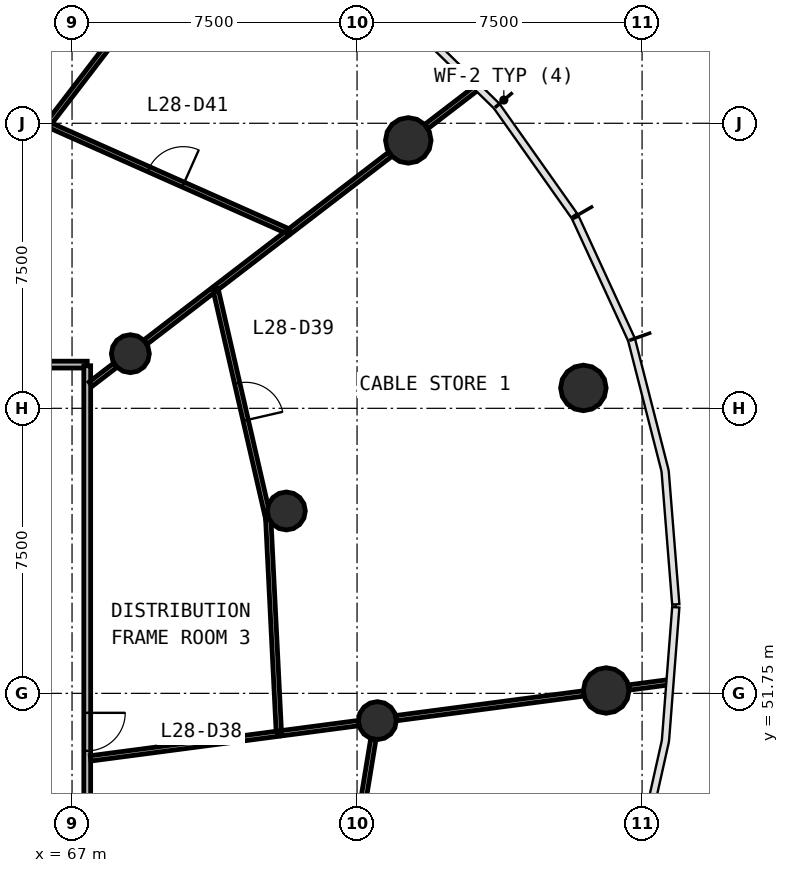
"""IFC4 building model, lengths in metres.
Left out: names, types, materials, properties, quantities, classifications, styles, units other than length and angle.
Written with IfcOpenShell. Run it as: python <this file> out.ifc"""

import sys

from ifc_helpers import new_model, si_unit, direction, frame, frame_2d, origin, origin_2d, place, context, subcontext, project, spatial, rectangle, circle, extrude, source, transform, mapped, element, fill, save


model = new_model("IFC4")
c1 = context("Model", 3, precision=1e-05, world=origin(), true_north=direction((0.0, 1.0)))
c2 = subcontext(c1, "Body", "Model", "MODEL_VIEW")
j1 = project(units=[si_unit("LENGTHUNIT", "METRE"), si_unit("PLANEANGLEUNIT", "RADIAN")], contexts=[c1])
p1 = place(None, origin())
s1 = spatial("IfcSite", under=j1, at=p1, CompositionType="ELEMENT")
p2 = place(p1, origin())
s2 = spatial("IfcBuilding", under=s1, at=p2, CompositionType="ELEMENT")
p3 = place(p2, frame((0.0, 0.0, 120.8)))
s3 = spatial("IfcBuildingStorey", under=s2, at=p3, CompositionType="ELEMENT", Elevation=120.8)
m1 = source(origin(), c2, "Body", "SweptSolid", [
    extrude(circle(Radius=0.6, at=origin_2d()), origin(), (0.0, 0.0, 1.0), 4.1),
])
for number, where, z_axis, x_axis in (
    (1, (81.056, 51.825, 0.0), (0.0, 0.0, 1.0), (1.0, 0.0, 0.0)),
    (2, (80.456, 59.787, 0.0), (0.0, 0.0, 1.0), (1.0, 0.0, 0.0)),
    (3, (75.848, 66.299, 0.0), (0.0, 0.0, 1.0), (1.0, 0.0, 0.0)),
):
    element("IfcColumn", number, at=place(p3, frame(where, z_axis=z_axis, x_axis=x_axis)), inside=s3, PredefinedType="COLUMN", context=c2, shape_type="MappedRepresentation", body=[
        mapped(m1, transform((0.0, 0.0, 0.0), scale=1.0)),
    ])
m2 = source(origin(), c2, "Body", "SweptSolid", [
    extrude(circle(Radius=0.5, at=origin_2d()), origin(), (0.0, 0.0, 1.0), 4.1),
])
for number, where, z_axis, x_axis in (
    (4, (75.034, 51.032, 0.0), (0.0, 0.0, 1.0), (1.0, 0.0, 0.0)),
    (5, (72.639, 56.549, 0.0), (0.0, 0.0, 1.0), (1.0, 0.0, 0.0)),
    (6, (68.535, 60.688, 0.0), (0.0, 0.0, 1.0), (1.0, 0.0, 0.0)),
):
    element("IfcColumn", number, at=place(p3, frame(where, z_axis=z_axis, x_axis=x_axis)), inside=s3, PredefinedType="COLUMN", context=c2, shape_type="MappedRepresentation", body=[
        mapped(m2, transform((0.0, 0.0, 0.0), scale=1.0)),
    ])
p4 = place(p3, frame((36.6, 60.4, 0.0), z_axis=(0.0, 0.0, 1.0), x_axis=(1.0, 0.0, 0.0)))
e7 = element("IfcWall", 7, at=p4, inside=s3, PredefinedType="PARTITIONING", context=c2, shape_type="SweptSolid", body=[
    extrude(rectangle(XDim=30.8, YDim=0.18, at=frame_2d((15.4, 0.0))), origin(), (0.0, 0.0, 1.0), 2.9),
])
p5 = place(p4, frame((14.85, 0.0, 0.0)))
e8 = element("IfcOpeningElement", 8, at=p5, cuts=e7, PredefinedType="OPENING", context=c2, shape_type="SweptSolid", body=[
    extrude(rectangle(XDim=0.9, YDim=2.1, at=frame_2d((0.45, 1.05))), frame((0.0, 0.1, 0.0), z_axis=(0.0, -1.0, 0.0), x_axis=(1.0, 0.0, 0.0)), (0.0, 0.0, 1.0), 0.2),
])
p6 = place(p4, frame((12.65, 0.0, 0.0)))
e9 = element("IfcOpeningElement", 9, at=p6, cuts=e7, PredefinedType="OPENING", context=c2, shape_type="SweptSolid", body=[
    extrude(rectangle(XDim=0.9, YDim=2.1, at=frame_2d((0.45, 1.05))), frame((0.0, 0.1, 0.0), z_axis=(0.0, -1.0, 0.0), x_axis=(1.0, 0.0, 0.0)), (0.0, 0.0, 1.0), 0.2),
])
p7 = place(p4, frame((8.95, 0.0, 0.0)))
e10 = element("IfcOpeningElement", 10, at=p7, cuts=e7, PredefinedType="OPENING", context=c2, shape_type="SweptSolid", body=[
    extrude(rectangle(XDim=1.0, YDim=2.1, at=frame_2d((0.5, 1.05))), frame((0.0, 0.1, 0.0), z_axis=(0.0, -1.0, 0.0), x_axis=(1.0, 0.0, 0.0)), (0.0, 0.0, 1.0), 0.2),
])
p8 = place(p4, frame((17.35, 0.0, 0.0)))
e11 = element("IfcOpeningElement", 11, at=p8, cuts=e7, PredefinedType="OPENING", context=c2, shape_type="SweptSolid", body=[
    extrude(rectangle(XDim=1.0, YDim=2.1, at=frame_2d((0.5, 1.05))), frame((0.0, 0.1, 0.0), z_axis=(0.0, -1.0, 0.0), x_axis=(1.0, 0.0, 0.0)), (0.0, 0.0, 1.0), 0.2),
])
p9 = place(p3, frame((67.4, 60.37, 0.0), z_axis=(0.0, 0.0, 1.0), x_axis=(0.0, -1.0, 0.0)))
e12 = element("IfcWall", 12, at=p9, inside=s3, PredefinedType="PARTITIONING", context=c2, shape_type="SweptSolid", body=[
    extrude(rectangle(XDim=23.583, YDim=0.18, at=frame_2d((11.791, 0.0))), origin(), (0.0, 0.0, 1.0), 2.9),
])
p10 = place(p9, frame((11.333, 0.0, 0.0)))
e13 = element("IfcOpeningElement", 13, at=p10, cuts=e12, PredefinedType="OPENING", context=c2, shape_type="SweptSolid", body=[
    extrude(rectangle(XDim=1.0, YDim=2.1, at=frame_2d((0.5, 1.05))), frame((0.0, 0.1, 0.0), z_axis=(0.0, -1.0, 0.0), x_axis=(1.0, 0.0, 0.0)), (0.0, 0.0, 1.0), 0.2),
])
p11 = place(p9, frame((9.133, 0.0, 0.0)))
e14 = element("IfcOpeningElement", 14, at=p11, cuts=e12, PredefinedType="OPENING", context=c2, shape_type="SweptSolid", body=[
    extrude(rectangle(XDim=1.0, YDim=2.1, at=frame_2d((0.5, 1.05))), frame((0.0, 0.1, 0.0), z_axis=(0.0, -1.0, 0.0), x_axis=(1.0, 0.0, 0.0)), (0.0, 0.0, 1.0), 0.2),
])
p12 = place(p3, frame((66.365, 66.721, 0.0), z_axis=(0.0, 0.0, 1.0), x_axis=(0.913647797107, -0.406506707006, 0.0)))
e15 = element("IfcWall", 15, at=p12, inside=s3, PredefinedType="PARTITIONING", context=c2, shape_type="SweptSolid", body=[
    extrude(rectangle(XDim=6.95, YDim=0.14, at=frame_2d((3.475, 0.0))), origin(), (0.0, 0.0, 1.0), 2.9),
])
p13 = place(p12, frame((2.9, 0.0, 0.0)))
e16 = element("IfcOpeningElement", 16, at=p13, cuts=e15, PredefinedType="OPENING", context=c2, shape_type="SweptSolid", body=[
    extrude(rectangle(XDim=1.0, YDim=2.1, at=frame_2d((0.5, 1.05))), frame((0.0, 0.08, 0.0), z_axis=(0.0, -1.0, 0.0), x_axis=(1.0, 0.0, 0.0)), (0.0, 0.0, 1.0), 0.16),
])
p14 = place(p3, frame((70.772, 62.404, 0.0), z_axis=(0.0, 0.0, 1.0), x_axis=(0.223963615519, -0.974597506114, 0.0)))
e17 = element("IfcWall", 17, at=p14, inside=s3, PredefinedType="PARTITIONING", context=c2, shape_type="SweptSolid", body=[
    extrude(rectangle(XDim=6.21, YDim=0.14, at=frame_2d((3.105, 0.0))), origin(), (0.0, 0.0, 1.0), 2.9),
])
p15 = place(p14, frame((2.56, 0.0, 0.0)))
e18 = element("IfcOpeningElement", 18, at=p15, cuts=e17, PredefinedType="OPENING", context=c2, shape_type="SweptSolid", body=[
    extrude(rectangle(XDim=1.0, YDim=2.1, at=frame_2d((0.5, 1.05))), frame((0.0, 0.08, 0.0), z_axis=(0.0, -1.0, 0.0), x_axis=(1.0, 0.0, 0.0)), (0.0, 0.0, 1.0), 0.16),
])
p16 = place(p3, frame((72.444, 50.691, 0.0), z_axis=(0.0, 0.0, 1.0), x_axis=(-0.049544491965, 0.998771917565, 0.0)))
e19 = element("IfcWall", 19, at=p16, inside=s3, PredefinedType="PARTITIONING", context=c2, shape_type="SweptSolid", body=[
    extrude(rectangle(XDim=5.637, YDim=0.14, at=frame_2d((2.819, 0.0))), origin(), (0.0, 0.0, 1.0), 2.9),
])
p17 = place(p3, frame((67.49, 50.039, 0.0), z_axis=(0.0, 0.0, 1.0), x_axis=(0.991445927378, 0.130518094863, 0.0)))
e20 = element("IfcWall", 20, at=p17, inside=s3, PredefinedType="PARTITIONING", context=c2, shape_type="SweptSolid", body=[
    extrude(rectangle(XDim=4.966, YDim=0.14, at=frame_2d((2.483, 0.0))), origin(), (0.0, 0.0, 1.0), 2.9),
])
p18 = place(p3, frame((74.927, 50.539, 0.0), z_axis=(0.0, 0.0, 1.0), x_axis=(-0.16231055227, -0.986739724863, 0.0)))
e21 = element("IfcWall", 21, at=p18, inside=s3, PredefinedType="PARTITIONING", context=c2, shape_type="SweptSolid", body=[
    extrude(rectangle(XDim=5.043, YDim=0.14, at=frame_2d((2.522, 0.0))), origin(), (0.0, 0.0, 1.0), 2.9),
])
p19 = place(p18, frame((1.993, 0.0, 0.0)))
e22 = element("IfcOpeningElement", 22, at=p19, cuts=e21, PredefinedType="OPENING", context=c2, shape_type="SweptSolid", body=[
    extrude(rectangle(XDim=1.0, YDim=2.1, at=frame_2d((0.5, 1.05))), frame((0.0, 0.08, 0.0), z_axis=(0.0, -1.0, 0.0), x_axis=(1.0, 0.0, 0.0)), (0.0, 0.0, 1.0), 0.16),
])
p20 = place(p3, frame((75.534, 51.098, 0.0), z_axis=(0.0, 0.0, 1.0), x_axis=(0.991443414541, 0.130537181533, 0.0)))
e23 = element("IfcWall", 23, at=p20, inside=s3, PredefinedType="PARTITIONING", context=c2, shape_type="SweptSolid", body=[
    extrude(rectangle(XDim=4.966, YDim=0.14, at=frame_2d((2.483, 0.0))), origin(), (0.0, 0.0, 1.0), 2.9),
])
p21 = place(p3, frame((66.409, 66.778, 0.0), z_axis=(0.0, 0.0, 1.0), x_axis=(0.608715955057, 0.793388231611, 0.0)))
e24 = element("IfcWall", 24, at=p21, inside=s3, PredefinedType="PARTITIONING", context=c2, shape_type="SweptSolid", body=[
    extrude(rectangle(XDim=3.892, YDim=0.14, at=frame_2d((1.946, 0.0))), origin(), (0.0, 0.0, 1.0), 2.9),
])
p22 = place(p3, frame((72.739, 63.914, 0.0), z_axis=(0.0, 0.0, 1.0), x_axis=(0.793376329811, 0.608731467312, 0.0)))
e25 = element("IfcWall", 25, at=p22, inside=s3, PredefinedType="PARTITIONING", context=c2, shape_type="SweptSolid", body=[
    extrude(rectangle(XDim=3.315, YDim=0.14, at=frame_2d((1.657, 0.0))), origin(), (0.0, 0.0, 1.0), 2.9),
])
p23 = place(p3, frame((70.796, 62.422, 0.0), z_axis=(0.0, 0.0, 1.0), x_axis=(0.79335268966, 0.608762276927, 0.0)))
e26 = element("IfcWall", 26, at=p23, inside=s3, PredefinedType="PARTITIONING", context=c2, shape_type="SweptSolid", body=[
    extrude(rectangle(XDim=2.34, YDim=0.14, at=frame_2d((1.17, 0.0))), origin(), (0.0, 0.0, 1.0), 2.9),
])
p24 = place(p3, frame((68.935, 60.995, 0.0), z_axis=(0.0, 0.0, 1.0), x_axis=(0.793288498534, 0.608845923115, 0.0)))
e27 = element("IfcWall", 27, at=p24, inside=s3, PredefinedType="PARTITIONING", context=c2, shape_type="SweptSolid", body=[
    extrude(rectangle(XDim=2.238, YDim=0.14, at=frame_2d((1.119, 0.0))), origin(), (0.0, 0.0, 1.0), 2.9),
])
p25 = place(p3, frame((72.513, 50.701, 0.0), z_axis=(0.0, 0.0, 1.0), x_axis=(0.991453480012, 0.130460710456, 0.0)))
e28 = element("IfcWall", 28, at=p25, inside=s3, PredefinedType="PARTITIONING", context=c2, shape_type="SweptSolid", body=[
    extrude(rectangle(XDim=2.038, YDim=0.14, at=frame_2d((1.019, 0.0))), origin(), (0.0, 0.0, 1.0), 2.9),
])
p26 = place(p3, frame((76.328, 66.667, 0.0), z_axis=(0.0, 0.0, 1.0), x_axis=(0.793358091605, 0.608755236925, 0.0)))
e29 = element("IfcWall", 29, at=p26, inside=s3, PredefinedType="PARTITIONING", context=c2, shape_type="SweptSolid", body=[
    extrude(rectangle(XDim=1.631, YDim=0.14, at=frame_2d((0.815, 0.0))), origin(), (0.0, 0.0, 1.0), 2.9),
])
p27 = place(p3, frame((81.656, 51.904, 0.0), z_axis=(0.0, 0.0, 1.0), x_axis=(0.991445519925, 0.130521189931, 0.0)))
e30 = element("IfcWall", 30, at=p27, inside=s3, PredefinedType="PARTITIONING", context=c2, shape_type="SweptSolid", body=[
    extrude(rectangle(XDim=1.042, YDim=0.14, at=frame_2d((0.521, 0.0))), origin(), (0.0, 0.0, 1.0), 2.9),
])
p28 = place(p3, frame((67.49, 59.886, 0.0), z_axis=(0.0, 0.0, 1.0), x_axis=(0.793316076519, 0.608809989025, 0.0)))
e31 = element("IfcWall", 31, at=p28, inside=s3, PredefinedType="PARTITIONING", context=c2, shape_type="SweptSolid", body=[
    extrude(rectangle(XDim=0.812, YDim=0.14, at=frame_2d((0.406, 0.0))), origin(), (0.0, 0.0, 1.0), 2.9),
])
m3 = source(origin(), c2, "Body", "SweptSolid", [
    extrude(rectangle(XDim=1.0, YDim=2.1, at=frame_2d((0.5, 1.05))), frame((0.0, 0.025, 0.0), z_axis=(0.0, -1.0, 0.0), x_axis=(1.0, 0.0, 0.0)), (0.0, 0.0, 1.0), 0.05),
])
p29 = place(p11, origin())
e32 = element("IfcDoor", 32, at=p29, inside=s3, OperationType="SINGLE_SWING_LEFT", PredefinedType="DOOR", context=c2, shape_type="MappedRepresentation", body=[
    mapped(m3, transform((0.0, 0.0, 0.0), scale=1.0)),
])
fill(e14, e32)
p30 = place(p15, origin())
e33 = element("IfcDoor", 33, at=p30, inside=s3, OperationType="SINGLE_SWING_RIGHT", PredefinedType="DOOR", context=c2, shape_type="MappedRepresentation", body=[
    mapped(m3, transform((0.0, 0.0, 0.0), scale=1.0)),
])
fill(e18, e33)
p31 = place(p13, origin())
e34 = element("IfcDoor", 34, at=p31, inside=s3, OperationType="SINGLE_SWING_RIGHT", PredefinedType="DOOR", context=c2, shape_type="MappedRepresentation", body=[
    mapped(m3, transform((0.0, 0.0, 0.0), scale=1.0)),
])
fill(e16, e34)
save(model, sys.argv[1])
